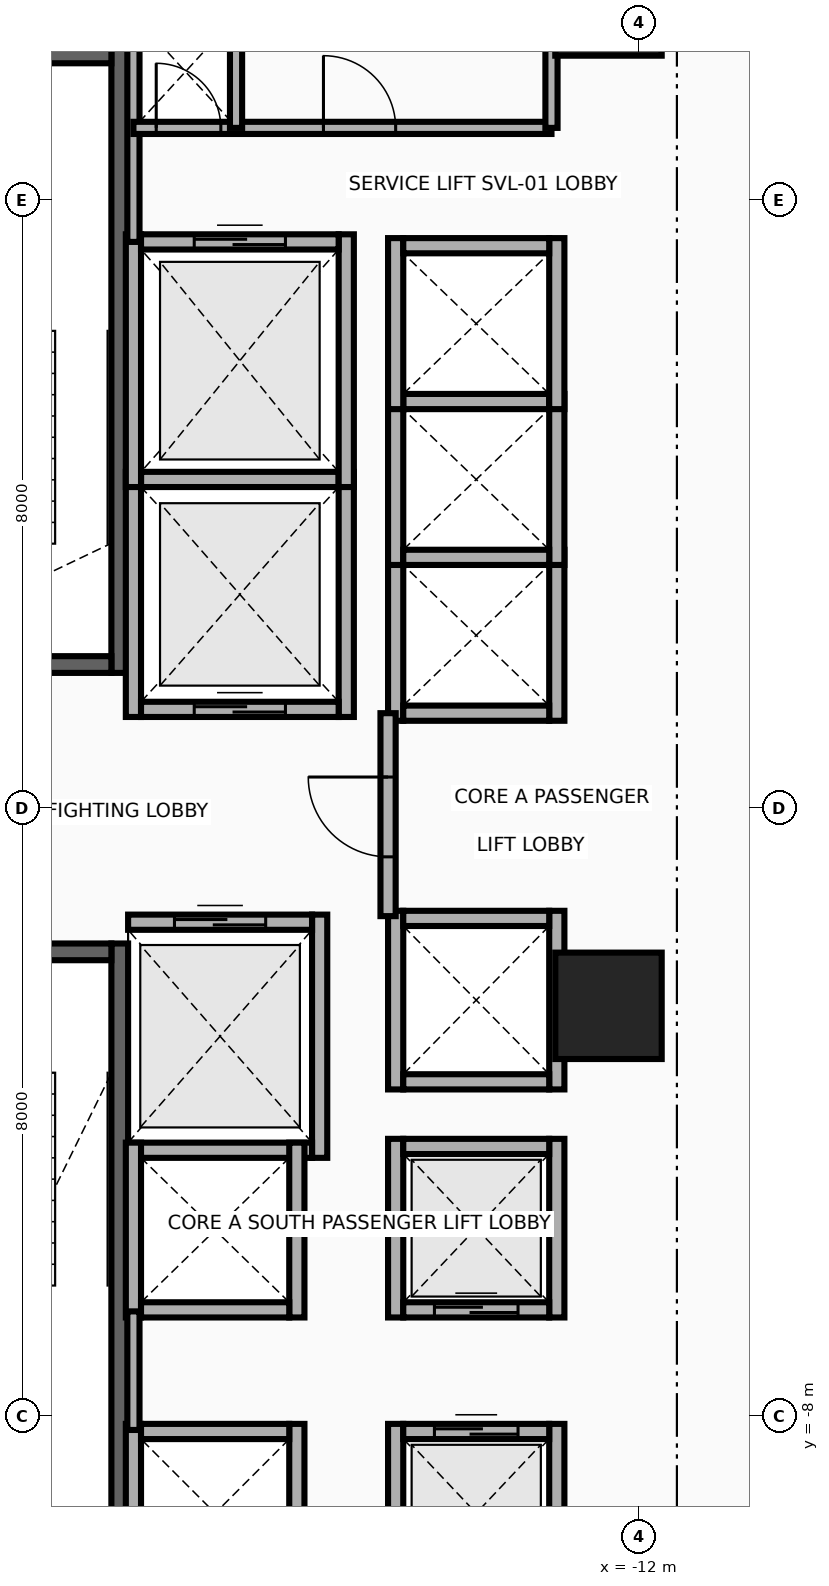
"""IFC4 building model, lengths in metres.
Left out: names, types, materials, properties, quantities, classifications, styles, units other than length and angle.
Written with IfcOpenShell. Run it as: python <this file> out.ifc"""

import sys

from ifc_helpers import new_model, si_unit, direction, frame, frame_2d, origin, origin_2d, place, context, subcontext, project, spatial, rectangle, extrude, source, transform, mapped, element, fill, save


model = new_model("IFC4")
c1 = context("Model", 3, precision=1e-05, world=origin(), true_north=direction((0.0, 1.0)))
c2 = subcontext(c1, "Body", "Model", "MODEL_VIEW")
j1 = project(units=[si_unit("LENGTHUNIT", "METRE"), si_unit("PLANEANGLEUNIT", "RADIAN")], contexts=[c1])
p1 = place(None, origin())
s1 = spatial("IfcSite", under=j1, at=p1, CompositionType="ELEMENT")
p2 = place(p1, origin())
s2 = spatial("IfcBuilding", under=s1, at=p2, CompositionType="ELEMENT")
p3 = place(p2, frame((0.0, 0.0, 66.7)))
s3 = spatial("IfcBuildingStorey", under=s2, at=p3, CompositionType="ELEMENT", Elevation=66.7)
p4 = place(p3, frame((-18.83, 1.78, 0.0), z_axis=(0.0, 0.0, 1.0), x_axis=(0.0, 1.0, 0.0)))
e1 = element("IfcWall", 1, at=p4, inside=s3, PredefinedType="SHEAR", context=c2, shape_type="SweptSolid", body=[
    extrude(rectangle(XDim=8.67, YDim=0.22, at=frame_2d((4.335, 0.0))), origin(), (0.0, 0.0, 1.0), 3.46),
])
p5 = place(p3, frame((-22.05, 1.89, 0.0), z_axis=(0.0, 0.0, 1.0), x_axis=(1.0, 0.0, 0.0)))
e2 = element("IfcWall", 2, at=p5, inside=s3, PredefinedType="SHEAR", context=c2, shape_type="SweptSolid", body=[
    extrude(rectangle(XDim=3.11, YDim=0.22, at=frame_2d((1.555, 0.0))), origin(), (0.0, 0.0, 1.0), 3.46),
])
p6 = place(p5, frame((1.0, 0.0, 0.0)))
e3 = element("IfcOpeningElement", 3, at=p6, cuts=e2, PredefinedType="OPENING", context=c2, shape_type="SweptSolid", body=[
    extrude(rectangle(XDim=1.1, YDim=2.15, at=frame_2d((0.55, 1.075))), frame((0.0, 0.125, 0.0), z_axis=(0.0, -1.0, 0.0), x_axis=(1.0, 0.0, 0.0)), (0.0, 0.0, 1.0), 0.25),
])
p7 = place(p3, frame((-22.05, 9.91, 0.0), z_axis=(0.0, 0.0, 1.0), x_axis=(1.0, 0.0, 0.0)))
e4 = element("IfcWall", 4, at=p7, inside=s3, PredefinedType="SHEAR", context=c2, shape_type="SweptSolid", body=[
    extrude(rectangle(XDim=3.11, YDim=0.22, at=frame_2d((1.555, 0.0))), origin(), (0.0, 0.0, 1.0), 3.46),
])
p8 = place(p3, frame((-18.83, -10.45, 0.0), z_axis=(0.0, 0.0, 1.0), x_axis=(0.0, 1.0, 0.0)))
e5 = element("IfcWall", 5, at=p8, inside=s3, PredefinedType="SHEAR", context=c2, shape_type="SweptSolid", body=[
    extrude(rectangle(XDim=8.67, YDim=0.22, at=frame_2d((4.335, 0.0))), origin(), (0.0, 0.0, 1.0), 3.46),
])
p9 = place(p3, frame((-22.05, -1.89, 0.0), z_axis=(0.0, 0.0, 1.0), x_axis=(1.0, 0.0, 0.0)))
e6 = element("IfcWall", 6, at=p9, inside=s3, PredefinedType="SHEAR", context=c2, shape_type="SweptSolid", body=[
    extrude(rectangle(XDim=3.11, YDim=0.22, at=frame_2d((1.555, 0.0))), origin(), (0.0, 0.0, 1.0), 3.46),
])
p10 = place(p9, frame((1.0, 0.0, 0.0)))
e7 = element("IfcOpeningElement", 7, at=p10, cuts=e6, PredefinedType="OPENING", context=c2, shape_type="SweptSolid", body=[
    extrude(rectangle(XDim=1.1, YDim=2.15, at=frame_2d((0.55, 1.075))), frame((0.0, 0.125, 0.0), z_axis=(0.0, -1.0, 0.0), x_axis=(1.0, 0.0, 0.0)), (0.0, 0.0, 1.0), 0.25),
])
m1 = source(origin(), c2, "Body", "SweptSolid", [
    extrude(rectangle(XDim=1.4, YDim=1.4, at=origin_2d()), origin(), (0.0, 0.0, 1.0), 3.7),
])
for number, where, z_axis, x_axis in (
    (8, (-12.4, -2.6, 0.0), (0.0, 0.0, 1.0), (1.0, 0.0, 0.0)),
    (9, (-12.4, 10.6, 0.0), (0.0, 0.0, 1.0), (1.0, 0.0, 0.0)),
):
    element("IfcColumn", number, at=place(p3, frame(where, z_axis=z_axis, x_axis=x_axis)), inside=s3, PredefinedType="COLUMN", context=c2, shape_type="MappedRepresentation", body=[
        mapped(m1, transform((0.0, 0.0, 0.0), x_axis=(1.0, 0.0, 0.0), y_axis=(0.0, 1.0, 0.0), z_axis=(0.0, 0.0, 1.0), scale=1.0)),
    ])
for number, where, z_axis, x_axis in (
    (10, (-18.65, 1.2, 0.0), (0.0, 0.0, 1.0), (0.0, 1.0, 0.0)),
    (11, (-15.85, 1.2, 0.0), (0.0, 0.0, 1.0), (0.0, 1.0, 0.0)),
):
    element("IfcWall", number, at=place(p3, frame(where, z_axis=z_axis, x_axis=x_axis)), inside=s3, PredefinedType="MOVABLE", context=c2, shape_type="SweptSolid", body=[
        extrude(rectangle(XDim=3.225, YDim=0.2, at=frame_2d((1.613, 0.0))), origin(), (0.0, 0.0, 1.0), 3.46),
    ])
p11 = place(p3, frame((-18.55, 1.3, 0.0), z_axis=(0.0, 0.0, 1.0), x_axis=(1.0, 0.0, 0.0)))
e12 = element("IfcWall", 12, at=p11, inside=s3, PredefinedType="MOVABLE", context=c2, shape_type="SweptSolid", body=[
    extrude(rectangle(XDim=2.6, YDim=0.2, at=frame_2d((1.3, 0.0))), origin(), (0.0, 0.0, 1.0), 3.46),
])
p12 = place(p11, frame((0.7, 0.0, 0.0)))
e13 = element("IfcOpeningElement", 13, at=p12, cuts=e12, PredefinedType="OPENING", context=c2, shape_type="SweptSolid", body=[
    extrude(rectangle(XDim=1.2, YDim=2.1, at=frame_2d((0.6, 1.05))), frame((0.0, 0.115, 0.0), z_axis=(0.0, -1.0, 0.0), x_axis=(1.0, 0.0, 0.0)), (0.0, 0.0, 1.0), 0.23),
])
p13 = place(p3, frame((-18.55, 4.325, 0.0), z_axis=(0.0, 0.0, 1.0), x_axis=(1.0, 0.0, 0.0)))
e14 = element("IfcWall", 14, at=p13, inside=s3, PredefinedType="MOVABLE", context=c2, shape_type="SweptSolid", body=[
    extrude(rectangle(XDim=2.6, YDim=0.2, at=frame_2d((1.3, 0.0))), origin(), (0.0, 0.0, 1.0), 3.46),
])
p14 = place(p3, frame((-16.2, -4.6, 0.0), z_axis=(0.0, 0.0, 1.0), x_axis=(0.0, 1.0, 0.0)))
e15 = element("IfcWall", 15, at=p14, inside=s3, PredefinedType="MOVABLE", context=c2, shape_type="SweptSolid", body=[
    extrude(rectangle(XDim=3.2, YDim=0.2, at=frame_2d((1.6, 0.0))), origin(), (0.0, 0.0, 1.0), 3.46),
])
p15 = place(p3, frame((-18.72, -4.5, 0.0), z_axis=(0.0, 0.0, 1.0), x_axis=(1.0, 0.0, 0.0)))
e16 = element("IfcWall", 16, at=p15, inside=s3, PredefinedType="MOVABLE", context=c2, shape_type="SweptSolid", body=[
    extrude(rectangle(XDim=2.42, YDim=0.2, at=frame_2d((1.21, 0.0))), origin(), (0.0, 0.0, 1.0), 3.46),
])
p16 = place(p3, frame((-18.72, -1.5, 0.0), z_axis=(0.0, 0.0, 1.0), x_axis=(1.0, 0.0, 0.0)))
e17 = element("IfcWall", 17, at=p16, inside=s3, PredefinedType="MOVABLE", context=c2, shape_type="SweptSolid", body=[
    extrude(rectangle(XDim=2.42, YDim=0.2, at=frame_2d((1.21, 0.0))), origin(), (0.0, 0.0, 1.0), 3.46),
])
p17 = place(p16, frame((0.61, 0.0, 0.0)))
e18 = element("IfcOpeningElement", 18, at=p17, cuts=e17, PredefinedType="OPENING", context=c2, shape_type="SweptSolid", body=[
    extrude(rectangle(XDim=1.2, YDim=2.1, at=frame_2d((0.6, 1.05))), frame((0.0, 0.115, 0.0), z_axis=(0.0, -1.0, 0.0), x_axis=(1.0, 0.0, 0.0)), (0.0, 0.0, 1.0), 0.23),
])
for number, where, z_axis, x_axis in (
    (19, (-18.65, 4.225, 0.0), (0.0, 0.0, 1.0), (0.0, 1.0, 0.0)),
    (20, (-15.85, 4.225, 0.0), (0.0, 0.0, 1.0), (0.0, 1.0, 0.0)),
):
    element("IfcWall", number, at=place(p3, frame(where, z_axis=z_axis, x_axis=x_axis)), inside=s3, PredefinedType="MOVABLE", context=c2, shape_type="SweptSolid", body=[
        extrude(rectangle(XDim=3.325, YDim=0.2, at=frame_2d((1.663, 0.0))), origin(), (0.0, 0.0, 1.0), 3.46),
    ])
p18 = place(p3, frame((-18.55, 7.45, 0.0), z_axis=(0.0, 0.0, 1.0), x_axis=(1.0, 0.0, 0.0)))
e21 = element("IfcWall", 21, at=p18, inside=s3, PredefinedType="MOVABLE", context=c2, shape_type="SweptSolid", body=[
    extrude(rectangle(XDim=2.6, YDim=0.2, at=frame_2d((1.3, 0.0))), origin(), (0.0, 0.0, 1.0), 3.46),
])
p19 = place(p18, frame((0.7, 0.0, 0.0)))
e22 = element("IfcOpeningElement", 22, at=p19, cuts=e21, PredefinedType="OPENING", context=c2, shape_type="SweptSolid", body=[
    extrude(rectangle(XDim=1.2, YDim=2.1, at=frame_2d((0.6, 1.05))), frame((0.0, 0.115, 0.0), z_axis=(0.0, -1.0, 0.0), x_axis=(1.0, 0.0, 0.0)), (0.0, 0.0, 1.0), 0.23),
])
for number, where, z_axis, x_axis in (
    (23, (-15.2, -10.45, 0.0), (0.0, 0.0, 1.0), (0.0, 1.0, 0.0)),
    (24, (-13.08, -10.45, 0.0), (0.0, 0.0, 1.0), (0.0, 1.0, 0.0)),
):
    element("IfcWall", number, at=place(p3, frame(where, z_axis=z_axis, x_axis=x_axis)), inside=s3, PredefinedType="MOVABLE", context=c2, shape_type="SweptSolid", body=[
        extrude(rectangle(XDim=2.35, YDim=0.2, at=frame_2d((1.175, 0.0))), origin(), (0.0, 0.0, 1.0), 2.583),
    ])
p20 = place(p3, frame((-15.1, -8.2, 0.0), z_axis=(0.0, 0.0, 1.0), x_axis=(1.0, 0.0, 0.0)))
e25 = element("IfcWall", 25, at=p20, inside=s3, PredefinedType="MOVABLE", context=c2, shape_type="SweptSolid", body=[
    extrude(rectangle(XDim=1.92, YDim=0.2, at=frame_2d((0.96, 0.0))), origin(), (0.0, 0.0, 1.0), 3.46),
])
p21 = place(p20, frame((0.41, 0.0, 0.0)))
e26 = element("IfcOpeningElement", 26, at=p21, cuts=e25, PredefinedType="OPENING", context=c2, shape_type="SweptSolid", body=[
    extrude(rectangle(XDim=1.1, YDim=2.1, at=frame_2d((0.55, 1.05))), frame((0.0, 0.115, 0.0), z_axis=(0.0, -1.0, 0.0), x_axis=(1.0, 0.0, 0.0)), (0.0, 0.0, 1.0), 0.23),
])
for number, where, z_axis, x_axis in (
    (27, (-15.2, -6.7, 0.0), (0.0, 0.0, 1.0), (0.0, 1.0, 0.0)),
    (28, (-13.08, -6.7, 0.0), (0.0, 0.0, 1.0), (0.0, 1.0, 0.0)),
):
    element("IfcWall", number, at=place(p3, frame(where, z_axis=z_axis, x_axis=x_axis)), inside=s3, PredefinedType="MOVABLE", context=c2, shape_type="SweptSolid", body=[
        extrude(rectangle(XDim=2.35, YDim=0.2, at=frame_2d((1.175, 0.0))), origin(), (0.0, 0.0, 1.0), 3.46),
    ])
p22 = place(p3, frame((-15.1, -6.6, 0.0), z_axis=(0.0, 0.0, 1.0), x_axis=(1.0, 0.0, 0.0)))
e29 = element("IfcWall", 29, at=p22, inside=s3, PredefinedType="MOVABLE", context=c2, shape_type="SweptSolid", body=[
    extrude(rectangle(XDim=1.92, YDim=0.2, at=frame_2d((0.96, 0.0))), origin(), (0.0, 0.0, 1.0), 3.46),
])
p23 = place(p22, frame((0.41, 0.0, 0.0)))
e30 = element("IfcOpeningElement", 30, at=p23, cuts=e29, PredefinedType="OPENING", context=c2, shape_type="SweptSolid", body=[
    extrude(rectangle(XDim=1.1, YDim=2.1, at=frame_2d((0.55, 1.05))), frame((0.0, 0.115, 0.0), z_axis=(0.0, -1.0, 0.0), x_axis=(1.0, 0.0, 0.0)), (0.0, 0.0, 1.0), 0.23),
])
p24 = place(p3, frame((-15.1, -4.45, 0.0), z_axis=(0.0, 0.0, 1.0), x_axis=(1.0, 0.0, 0.0)))
e31 = element("IfcWall", 31, at=p24, inside=s3, PredefinedType="MOVABLE", context=c2, shape_type="SweptSolid", body=[
    extrude(rectangle(XDim=1.92, YDim=0.2, at=frame_2d((0.96, 0.0))), origin(), (0.0, 0.0, 1.0), 3.46),
])
for number, where, z_axis, x_axis in (
    (32, (-18.65, -10.45, 0.0), (0.0, 0.0, 1.0), (0.0, 1.0, 0.0)),
    (33, (-16.5, -10.45, 0.0), (0.0, 0.0, 1.0), (0.0, 1.0, 0.0)),
):
    element("IfcWall", number, at=place(p3, frame(where, z_axis=z_axis, x_axis=x_axis)), inside=s3, PredefinedType="MOVABLE", context=c2, shape_type="SweptSolid", body=[
        extrude(rectangle(XDim=2.35, YDim=0.2, at=frame_2d((1.175, 0.0))), origin(), (0.0, 0.0, 1.0), 2.583),
    ])
p25 = place(p3, frame((-18.55, -8.2, 0.0), z_axis=(0.0, 0.0, 1.0), x_axis=(1.0, 0.0, 0.0)))
e34 = element("IfcWall", 34, at=p25, inside=s3, PredefinedType="MOVABLE", context=c2, shape_type="SweptSolid", body=[
    extrude(rectangle(XDim=1.95, YDim=0.2, at=frame_2d((0.975, 0.0))), origin(), (0.0, 0.0, 1.0), 3.46),
])
for number, where, z_axis, x_axis in (
    (35, (-15.2, 1.15, 0.0), (0.0, 0.0, 1.0), (0.0, 1.0, 0.0)),
    (36, (-13.08, 1.15, 0.0), (0.0, 0.0, 1.0), (0.0, 1.0, 0.0)),
):
    element("IfcWall", number, at=place(p3, frame(where, z_axis=z_axis, x_axis=x_axis)), inside=s3, PredefinedType="MOVABLE", context=c2, shape_type="SweptSolid", body=[
        extrude(rectangle(XDim=2.25, YDim=0.2, at=frame_2d((1.125, 0.0))), origin(), (0.0, 0.0, 1.0), 3.46),
    ])
p26 = place(p3, frame((-15.1, 1.25, 0.0), z_axis=(0.0, 0.0, 1.0), x_axis=(1.0, 0.0, 0.0)))
e37 = element("IfcWall", 37, at=p26, inside=s3, PredefinedType="MOVABLE", context=c2, shape_type="SweptSolid", body=[
    extrude(rectangle(XDim=1.92, YDim=0.2, at=frame_2d((0.96, 0.0))), origin(), (0.0, 0.0, 1.0), 3.46),
])
for number, where, z_axis, x_axis in (
    (38, (-15.2, 3.2, 0.0), (0.0, 0.0, 1.0), (0.0, 1.0, 0.0)),
    (39, (-13.08, 3.2, 0.0), (0.0, 0.0, 1.0), (0.0, 1.0, 0.0)),
):
    element("IfcWall", number, at=place(p3, frame(where, z_axis=z_axis, x_axis=x_axis)), inside=s3, PredefinedType="MOVABLE", context=c2, shape_type="SweptSolid", body=[
        extrude(rectangle(XDim=2.25, YDim=0.2, at=frame_2d((1.125, 0.0))), origin(), (0.0, 0.0, 1.0), 3.46),
    ])
for number, where, z_axis, x_axis in (
    (40, (-15.1, 3.3, 0.0), (0.0, 0.0, 1.0), (1.0, 0.0, 0.0)),
    (41, (-15.1, 5.35, 0.0), (0.0, 0.0, 1.0), (1.0, 0.0, 0.0)),
):
    element("IfcWall", number, at=place(p3, frame(where, z_axis=z_axis, x_axis=x_axis)), inside=s3, PredefinedType="MOVABLE", context=c2, shape_type="SweptSolid", body=[
        extrude(rectangle(XDim=1.92, YDim=0.2, at=frame_2d((0.96, 0.0))), origin(), (0.0, 0.0, 1.0), 3.46),
    ])
for number, where, z_axis, x_axis in (
    (42, (-15.2, 5.25, 0.0), (0.0, 0.0, 1.0), (0.0, 1.0, 0.0)),
    (43, (-13.08, 5.25, 0.0), (0.0, 0.0, 1.0), (0.0, 1.0, 0.0)),
):
    element("IfcWall", number, at=place(p3, frame(where, z_axis=z_axis, x_axis=x_axis)), inside=s3, PredefinedType="MOVABLE", context=c2, shape_type="SweptSolid", body=[
        extrude(rectangle(XDim=2.25, YDim=0.2, at=frame_2d((1.125, 0.0))), origin(), (0.0, 0.0, 1.0), 3.46),
    ])
p27 = place(p3, frame((-15.1, 7.4, 0.0), z_axis=(0.0, 0.0, 1.0), x_axis=(1.0, 0.0, 0.0)))
e44 = element("IfcWall", 44, at=p27, inside=s3, PredefinedType="MOVABLE", context=c2, shape_type="SweptSolid", body=[
    extrude(rectangle(XDim=1.92, YDim=0.2, at=frame_2d((0.96, 0.0))), origin(), (0.0, 0.0, 1.0), 3.46),
])
for number, where, z_axis, x_axis in (
    (45, (-18.65, -6.7, 0.0), (0.0, 0.0, 1.0), (0.0, 1.0, 0.0)),
    (46, (-16.5, -6.7, 0.0), (0.0, 0.0, 1.0), (0.0, 1.0, 0.0)),
):
    element("IfcWall", number, at=place(p3, frame(where, z_axis=z_axis, x_axis=x_axis)), inside=s3, PredefinedType="MOVABLE", context=c2, shape_type="SweptSolid", body=[
        extrude(rectangle(XDim=2.3, YDim=0.2, at=frame_2d((1.15, 0.0))), origin(), (0.0, 0.0, 1.0), 3.46),
    ])
p28 = place(p3, frame((-18.55, -6.6, 0.0), z_axis=(0.0, 0.0, 1.0), x_axis=(1.0, 0.0, 0.0)))
e47 = element("IfcWall", 47, at=p28, inside=s3, PredefinedType="MOVABLE", context=c2, shape_type="SweptSolid", body=[
    extrude(rectangle(XDim=1.95, YDim=0.2, at=frame_2d((0.975, 0.0))), origin(), (0.0, 0.0, 1.0), 3.46),
])
for number, where, z_axis, x_axis in (
    (48, (-15.2, -3.7, 0.0), (0.0, 0.0, 1.0), (0.0, 1.0, 0.0)),
    (49, (-13.08, -3.7, 0.0), (0.0, 0.0, 1.0), (0.0, 1.0, 0.0)),
):
    element("IfcWall", number, at=place(p3, frame(where, z_axis=z_axis, x_axis=x_axis)), inside=s3, PredefinedType="MOVABLE", context=c2, shape_type="SweptSolid", body=[
        extrude(rectangle(XDim=2.35, YDim=0.2, at=frame_2d((1.175, 0.0))), origin(), (0.0, 0.0, 1.0), 3.46),
    ])
for number, where, z_axis, x_axis in (
    (50, (-15.1, -3.6, 0.0), (0.0, 0.0, 1.0), (1.0, 0.0, 0.0)),
    (51, (-15.1, -1.45, 0.0), (0.0, 0.0, 1.0), (1.0, 0.0, 0.0)),
):
    element("IfcWall", number, at=place(p3, frame(where, z_axis=z_axis, x_axis=x_axis)), inside=s3, PredefinedType="MOVABLE", context=c2, shape_type="SweptSolid", body=[
        extrude(rectangle(XDim=1.92, YDim=0.2, at=frame_2d((0.96, 0.0))), origin(), (0.0, 0.0, 1.0), 3.46),
    ])
p29 = place(p3, frame((-15.3, -1.42, 0.0), z_axis=(0.0, 0.0, 1.0), x_axis=(0.0, 1.0, 0.0)))
e52 = element("IfcWall", 52, at=p29, inside=s3, PredefinedType="PARTITIONING", context=c2, shape_type="SweptSolid", body=[
    extrude(rectangle(XDim=2.67, YDim=0.2, at=frame_2d((1.335, 0.0))), origin(), (0.0, 0.0, 1.0), 3.46),
])
p30 = place(p29, frame((0.78, 0.0, 0.0)))
e53 = element("IfcOpeningElement", 53, at=p30, cuts=e52, PredefinedType="OPENING", context=c2, shape_type="SweptSolid", body=[
    extrude(rectangle(XDim=1.05, YDim=2.15, at=frame_2d((0.525, 1.075))), frame((0.0, 0.115, 0.0), z_axis=(0.0, -1.0, 0.0), x_axis=(1.0, 0.0, 0.0)), (0.0, 0.0, 1.0), 0.23),
])
p31 = place(p3, frame((-18.65, 7.45, 0.0), z_axis=(0.0, 0.0, 1.0), x_axis=(0.0, 1.0, 0.0)))
e54 = element("IfcWall", 54, at=p31, inside=s3, PredefinedType="PARTITIONING", context=c2, shape_type="SweptSolid", body=[
    extrude(rectangle(XDim=2.93, YDim=0.16, at=frame_2d((1.465, 0.0))), origin(), (0.0, 0.0, 1.0), 3.46),
])
p32 = place(p3, frame((-18.65, -8.18, 0.0), z_axis=(0.0, 0.0, 1.0), x_axis=(0.0, 1.0, 0.0)))
e55 = element("IfcWall", 55, at=p32, inside=s3, PredefinedType="PARTITIONING", context=c2, shape_type="SweptSolid", body=[
    extrude(rectangle(XDim=1.56, YDim=0.16, at=frame_2d((0.78, 0.0))), origin(), (0.0, 0.0, 1.0), 3.46),
])
p33 = place(p3, frame((-18.65, 8.95, 0.0), z_axis=(0.0, 0.0, 1.0), x_axis=(1.0, 0.0, 0.0)))
e56 = element("IfcWall", 56, at=p33, inside=s3, PredefinedType="PARTITIONING", context=c2, shape_type="SweptSolid", body=[
    extrude(rectangle(XDim=5.5, YDim=0.16, at=frame_2d((2.75, 0.0))), origin(), (0.0, 0.0, 1.0), 3.46),
])
p34 = place(p33, frame((0.3, 0.0, 0.0)))
e57 = element("IfcOpeningElement", 57, at=p34, cuts=e56, PredefinedType="OPENING", context=c2, shape_type="SweptSolid", body=[
    extrude(rectangle(XDim=0.85, YDim=2.05, at=frame_2d((0.425, 1.025))), frame((0.0, 0.095, 0.0), z_axis=(0.0, -1.0, 0.0), x_axis=(1.0, 0.0, 0.0)), (0.0, 0.0, 1.0), 0.19),
])
p35 = place(p33, frame((2.5, 0.0, 0.0)))
e58 = element("IfcOpeningElement", 58, at=p35, cuts=e56, PredefinedType="OPENING", context=c2, shape_type="SweptSolid", body=[
    extrude(rectangle(XDim=0.95, YDim=2.15, at=frame_2d((0.475, 1.075))), frame((0.0, 0.095, 0.0), z_axis=(0.0, -1.0, 0.0), x_axis=(1.0, 0.0, 0.0)), (0.0, 0.0, 1.0), 0.19),
])
for number, where, z_axis, x_axis in (
    (59, (-13.15, 8.95, 0.0), (0.0, 0.0, 1.0), (0.0, 1.0, 0.0)),
    (60, (-17.3, 8.95, 0.0), (0.0, 0.0, 1.0), (0.0, 1.0, 0.0)),
):
    element("IfcWall", number, at=place(p3, frame(where, z_axis=z_axis, x_axis=x_axis)), inside=s3, PredefinedType="PARTITIONING", context=c2, shape_type="SweptSolid", body=[
        extrude(rectangle(XDim=1.43, YDim=0.16, at=frame_2d((0.715, 0.0))), origin(), (0.0, 0.0, 1.0), 3.46),
    ])
p36 = place(p12, origin())
e61 = element("IfcDoor", 61, at=p36, inside=s3, OperationType="DOUBLE_DOOR_SLIDING", PredefinedType="DOOR", context=c2, shape_type="SweptSolid", body=[
    extrude(rectangle(XDim=1.2, YDim=2.1, at=frame_2d((0.6, 1.05))), frame((0.0, 0.025, 0.0), z_axis=(0.0, -1.0, 0.0), x_axis=(1.0, 0.0, 0.0)), (0.0, 0.0, 1.0), 0.05),
])
fill(e13, e61)
p37 = place(p17, origin())
e62 = element("IfcDoor", 62, at=p37, inside=s3, OperationType="DOUBLE_DOOR_SLIDING", PredefinedType="DOOR", context=c2, shape_type="SweptSolid", body=[
    extrude(rectangle(XDim=1.2, YDim=2.1, at=frame_2d((0.6, 1.05))), frame((0.0, 0.025, 0.0), z_axis=(0.0, -1.0, 0.0), x_axis=(1.0, 0.0, 0.0)), (0.0, 0.0, 1.0), 0.05),
])
fill(e18, e62)
p38 = place(p19, origin())
e63 = element("IfcDoor", 63, at=p38, inside=s3, OperationType="DOUBLE_DOOR_SLIDING", PredefinedType="DOOR", context=c2, shape_type="SweptSolid", body=[
    extrude(rectangle(XDim=1.2, YDim=2.1, at=frame_2d((0.6, 1.05))), frame((0.0, 0.025, 0.0), z_axis=(0.0, -1.0, 0.0), x_axis=(1.0, 0.0, 0.0)), (0.0, 0.0, 1.0), 0.05),
])
fill(e22, e63)
p39 = place(p21, origin())
e64 = element("IfcDoor", 64, at=p39, inside=s3, OperationType="DOUBLE_DOOR_SLIDING", PredefinedType="DOOR", context=c2, shape_type="SweptSolid", body=[
    extrude(rectangle(XDim=1.1, YDim=2.1, at=frame_2d((0.55, 1.05))), frame((0.0, 0.025, 0.0), z_axis=(0.0, -1.0, 0.0), x_axis=(1.0, 0.0, 0.0)), (0.0, 0.0, 1.0), 0.05),
])
fill(e26, e64)
p40 = place(p23, origin())
e65 = element("IfcDoor", 65, at=p40, inside=s3, OperationType="DOUBLE_DOOR_SLIDING", PredefinedType="DOOR", context=c2, shape_type="SweptSolid", body=[
    extrude(rectangle(XDim=1.1, YDim=2.1, at=frame_2d((0.55, 1.05))), frame((0.0, 0.025, 0.0), z_axis=(0.0, -1.0, 0.0), x_axis=(1.0, 0.0, 0.0)), (0.0, 0.0, 1.0), 0.05),
])
fill(e30, e65)
p41 = place(p30, origin())
e66 = element("IfcDoor", 66, at=p41, inside=s3, OperationType="SINGLE_SWING_RIGHT", PredefinedType="DOOR", context=c2, shape_type="SweptSolid", body=[
    extrude(rectangle(XDim=1.05, YDim=2.15, at=frame_2d((0.525, 1.075))), frame((0.0, 0.025, 0.0), z_axis=(0.0, -1.0, 0.0), x_axis=(1.0, 0.0, 0.0)), (0.0, 0.0, 1.0), 0.05),
])
fill(e53, e66)
p42 = place(p34, origin())
e67 = element("IfcDoor", 67, at=p42, inside=s3, OperationType="SINGLE_SWING_LEFT", PredefinedType="DOOR", context=c2, shape_type="SweptSolid", body=[
    extrude(rectangle(XDim=0.85, YDim=2.05, at=frame_2d((0.425, 1.025))), frame((0.0, 0.025, 0.0), z_axis=(0.0, -1.0, 0.0), x_axis=(1.0, 0.0, 0.0)), (0.0, 0.0, 1.0), 0.05),
])
fill(e57, e67)
p43 = place(p35, origin())
e68 = element("IfcDoor", 68, at=p43, inside=s3, OperationType="SINGLE_SWING_RIGHT", PredefinedType="DOOR", context=c2, shape_type="SweptSolid", body=[
    extrude(rectangle(XDim=0.95, YDim=2.15, at=frame_2d((0.475, 1.075))), frame((0.0, 0.025, 0.0), z_axis=(0.0, -1.0, 0.0), x_axis=(1.0, 0.0, 0.0)), (0.0, 0.0, 1.0), 0.05),
])
fill(e58, e68)
save(model, sys.argv[1])
